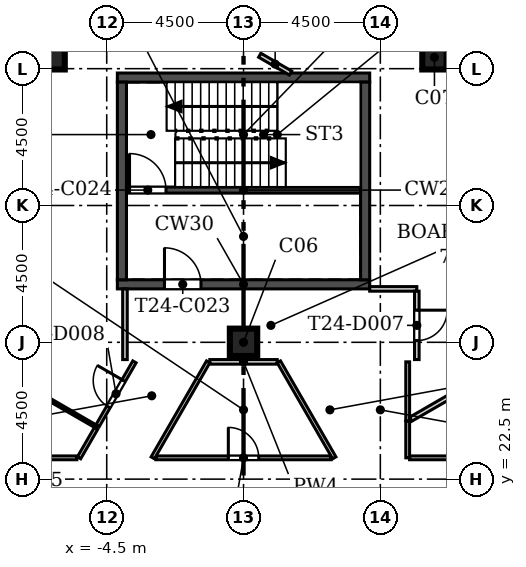
"""IFC4 building model, lengths in metres.
Left out: names, types, materials, properties, quantities, classifications, styles, units other than length and angle.
Written with IfcOpenShell. Run it as: python <this file> out.ifc"""

import sys

from ifc_helpers import new_model, si_unit, direction, frame, frame_2d, origin, origin_2d, place, context, subcontext, project, spatial, rectangle, extrude, element, fill, save


model = new_model("IFC4")
c1 = context("Model", 3, precision=1e-05, world=origin(), true_north=direction((0.0, 1.0)))
c2 = subcontext(c1, "Body", "Model", "MODEL_VIEW")
j1 = project(units=[si_unit("LENGTHUNIT", "METRE"), si_unit("PLANEANGLEUNIT", "RADIAN")], contexts=[c1])
p1 = place(None, origin())
s1 = spatial("IfcSite", under=j1, at=p1, CompositionType="ELEMENT")
p2 = place(p1, origin())
s2 = spatial("IfcBuilding", under=s1, at=p2, CompositionType="ELEMENT")
p3 = place(p2, frame((0.0, 0.0, 335.1)))
s3 = spatial("IfcBuildingStorey", under=s2, at=p3, CompositionType="ELEMENT", Elevation=335.1)
for number, where, z_axis, x_axis in (
    (1, (6.28, 36.374, 0.0), (0.0, 0.0, 1.0), (1.0, 0.0, 0.0)),
    (2, (-6.28, 36.374, 0.0), (0.0, 0.0, 1.0), (1.0, 0.0, 0.0)),
):
    element("IfcColumn", number, at=place(p3, frame(where, z_axis=z_axis, x_axis=x_axis)), inside=s3, PredefinedType="COLUMN", context=c2, shape_type="SweptSolid", body=[
        extrude(rectangle(XDim=0.8, YDim=0.8, at=origin_2d()), origin(), (0.0, 0.0, 1.0), 4.2),
    ])
p4 = place(p3, frame((0.0, 27.0, 0.0), z_axis=(0.0, 0.0, 1.0), x_axis=(1.0, 0.0, 0.0)))
e3 = element("IfcColumn", 3, at=p4, inside=s3, PredefinedType="COLUMN", context=c2, shape_type="SweptSolid", body=[
    extrude(rectangle(XDim=0.9, YDim=0.9, at=origin_2d()), origin(), (0.0, 0.0, 1.0), 4.2),
])
p5 = place(p3, frame((23.788, 7.709, 0.0), z_axis=(0.0, 0.0, 1.0), x_axis=(-0.500001731347, 0.866024404189, 0.0)))
e4 = element("IfcWall", 4, at=p5, inside=s3, PredefinedType="SOLIDWALL", context=c2, shape_type="SweptSolid", body=[
    extrude(rectangle(XDim=38.87, YDim=0.34, at=frame_2d((19.435, 0.0))), origin(), (0.0, 0.0, 1.0), 3.8),
])
p6 = place(p5, frame((3.218, 0.0, 0.9)))
e5 = element("IfcOpeningElement", 5, at=p6, cuts=e4, PredefinedType="OPENING", context=c2, shape_type="SweptSolid", body=[
    extrude(rectangle(XDim=1.885, YDim=2.6, at=frame_2d((0.942, 1.3))), frame((0.0, 0.18, 0.0), z_axis=(0.0, -1.0, 0.0), x_axis=(1.0, 0.0, 0.0)), (0.0, 0.0, 1.0), 0.36),
])
p7 = place(p5, frame((6.218, 0.0, 0.9)))
e6 = element("IfcOpeningElement", 6, at=p7, cuts=e4, PredefinedType="OPENING", context=c2, shape_type="SweptSolid", body=[
    extrude(rectangle(XDim=1.885, YDim=2.6, at=frame_2d((0.942, 1.3))), frame((0.0, 0.18, 0.0), z_axis=(0.0, -1.0, 0.0), x_axis=(1.0, 0.0, 0.0)), (0.0, 0.0, 1.0), 0.36),
])
p8 = place(p5, frame((9.218, 0.0, 0.9)))
e7 = element("IfcOpeningElement", 7, at=p8, cuts=e4, PredefinedType="OPENING", context=c2, shape_type="SweptSolid", body=[
    extrude(rectangle(XDim=1.885, YDim=2.6, at=frame_2d((0.942, 1.3))), frame((0.0, 0.18, 0.0), z_axis=(0.0, -1.0, 0.0), x_axis=(1.0, 0.0, 0.0)), (0.0, 0.0, 1.0), 0.36),
])
p9 = place(p5, frame((12.218, 0.0, 0.9)))
e8 = element("IfcOpeningElement", 8, at=p9, cuts=e4, PredefinedType="OPENING", context=c2, shape_type="SweptSolid", body=[
    extrude(rectangle(XDim=1.885, YDim=2.6, at=frame_2d((0.942, 1.3))), frame((0.0, 0.18, 0.0), z_axis=(0.0, -1.0, 0.0), x_axis=(1.0, 0.0, 0.0)), (0.0, 0.0, 1.0), 0.36),
])
p10 = place(p5, frame((15.218, 0.0, 0.9)))
e9 = element("IfcOpeningElement", 9, at=p10, cuts=e4, PredefinedType="OPENING", context=c2, shape_type="SweptSolid", body=[
    extrude(rectangle(XDim=1.885, YDim=2.6, at=frame_2d((0.942, 1.3))), frame((0.0, 0.18, 0.0), z_axis=(0.0, -1.0, 0.0), x_axis=(1.0, 0.0, 0.0)), (0.0, 0.0, 1.0), 0.36),
])
p11 = place(p5, frame((18.218, 0.0, 0.9)))
e10 = element("IfcOpeningElement", 10, at=p11, cuts=e4, PredefinedType="OPENING", context=c2, shape_type="SweptSolid", body=[
    extrude(rectangle(XDim=1.885, YDim=2.6, at=frame_2d((0.942, 1.3))), frame((0.0, 0.18, 0.0), z_axis=(0.0, -1.0, 0.0), x_axis=(1.0, 0.0, 0.0)), (0.0, 0.0, 1.0), 0.36),
])
p12 = place(p5, frame((21.218, 0.0, 0.9)))
e11 = element("IfcOpeningElement", 11, at=p12, cuts=e4, PredefinedType="OPENING", context=c2, shape_type="SweptSolid", body=[
    extrude(rectangle(XDim=1.885, YDim=2.6, at=frame_2d((0.942, 1.3))), frame((0.0, 0.18, 0.0), z_axis=(0.0, -1.0, 0.0), x_axis=(1.0, 0.0, 0.0)), (0.0, 0.0, 1.0), 0.36),
])
p13 = place(p5, frame((24.218, 0.0, 0.9)))
e12 = element("IfcOpeningElement", 12, at=p13, cuts=e4, PredefinedType="OPENING", context=c2, shape_type="SweptSolid", body=[
    extrude(rectangle(XDim=1.885, YDim=2.6, at=frame_2d((0.942, 1.3))), frame((0.0, 0.18, 0.0), z_axis=(0.0, -1.0, 0.0), x_axis=(1.0, 0.0, 0.0)), (0.0, 0.0, 1.0), 0.36),
])
p14 = place(p5, frame((27.218, 0.0, 0.9)))
e13 = element("IfcOpeningElement", 13, at=p14, cuts=e4, PredefinedType="OPENING", context=c2, shape_type="SweptSolid", body=[
    extrude(rectangle(XDim=1.885, YDim=2.6, at=frame_2d((0.942, 1.3))), frame((0.0, 0.18, 0.0), z_axis=(0.0, -1.0, 0.0), x_axis=(1.0, 0.0, 0.0)), (0.0, 0.0, 1.0), 0.36),
])
p15 = place(p5, frame((30.218, 0.0, 0.9)))
e14 = element("IfcOpeningElement", 14, at=p15, cuts=e4, PredefinedType="OPENING", context=c2, shape_type="SweptSolid", body=[
    extrude(rectangle(XDim=1.885, YDim=2.6, at=frame_2d((0.942, 1.3))), frame((0.0, 0.18, 0.0), z_axis=(0.0, -1.0, 0.0), x_axis=(1.0, 0.0, 0.0)), (0.0, 0.0, 1.0), 0.36),
])
p16 = place(p5, frame((33.218, 0.0, 0.9)))
e15 = element("IfcOpeningElement", 15, at=p16, cuts=e4, PredefinedType="OPENING", context=c2, shape_type="SweptSolid", body=[
    extrude(rectangle(XDim=1.885, YDim=2.6, at=frame_2d((0.942, 1.3))), frame((0.0, 0.18, 0.0), z_axis=(0.0, -1.0, 0.0), x_axis=(1.0, 0.0, 0.0)), (0.0, 0.0, 1.0), 0.36),
])
p17 = place(p5, frame((1.051, 0.0, 0.9)))
e16 = element("IfcOpeningElement", 16, at=p17, cuts=e4, PredefinedType="OPENING", context=c2, shape_type="SweptSolid", body=[
    extrude(rectangle(XDim=1.115, YDim=2.4, at=frame_2d((0.558, 1.2))), frame((0.0, 0.18, 0.0), z_axis=(0.0, -1.0, 0.0), x_axis=(1.0, 0.0, 0.0)), (0.0, 0.0, 1.0), 0.36),
])
p18 = place(p5, frame((36.429, 0.0, 0.9)))
e17 = element("IfcOpeningElement", 17, at=p18, cuts=e4, PredefinedType="OPENING", context=c2, shape_type="SweptSolid", body=[
    extrude(rectangle(XDim=1.115, YDim=2.4, at=frame_2d((0.558, 1.2))), frame((0.0, 0.18, 0.0), z_axis=(0.0, -1.0, 0.0), x_axis=(1.0, 0.0, 0.0)), (0.0, 0.0, 1.0), 0.36),
])
p19 = place(p3, frame((-4.353, 41.372, 0.0), z_axis=(0.0, 0.0, 1.0), x_axis=(-0.500001731347, -0.866024404189, 0.0)))
e18 = element("IfcWall", 18, at=p19, inside=s3, PredefinedType="SOLIDWALL", context=c2, shape_type="SweptSolid", body=[
    extrude(rectangle(XDim=38.87, YDim=0.34, at=frame_2d((19.435, 0.0))), origin(), (0.0, 0.0, 1.0), 3.8),
])
p20 = place(p19, frame((3.653, 0.0, 0.9)))
e19 = element("IfcOpeningElement", 19, at=p20, cuts=e18, PredefinedType="OPENING", context=c2, shape_type="SweptSolid", body=[
    extrude(rectangle(XDim=1.885, YDim=2.6, at=frame_2d((0.942, 1.3))), frame((0.0, 0.18, 0.0), z_axis=(0.0, -1.0, 0.0), x_axis=(1.0, 0.0, 0.0)), (0.0, 0.0, 1.0), 0.36),
])
p21 = place(p19, frame((6.653, 0.0, 0.9)))
e20 = element("IfcOpeningElement", 20, at=p21, cuts=e18, PredefinedType="OPENING", context=c2, shape_type="SweptSolid", body=[
    extrude(rectangle(XDim=1.885, YDim=2.6, at=frame_2d((0.942, 1.3))), frame((0.0, 0.18, 0.0), z_axis=(0.0, -1.0, 0.0), x_axis=(1.0, 0.0, 0.0)), (0.0, 0.0, 1.0), 0.36),
])
p22 = place(p19, frame((9.653, 0.0, 0.9)))
e21 = element("IfcOpeningElement", 21, at=p22, cuts=e18, PredefinedType="OPENING", context=c2, shape_type="SweptSolid", body=[
    extrude(rectangle(XDim=1.885, YDim=2.6, at=frame_2d((0.942, 1.3))), frame((0.0, 0.18, 0.0), z_axis=(0.0, -1.0, 0.0), x_axis=(1.0, 0.0, 0.0)), (0.0, 0.0, 1.0), 0.36),
])
p23 = place(p19, frame((12.653, 0.0, 0.9)))
e22 = element("IfcOpeningElement", 22, at=p23, cuts=e18, PredefinedType="OPENING", context=c2, shape_type="SweptSolid", body=[
    extrude(rectangle(XDim=1.885, YDim=2.6, at=frame_2d((0.942, 1.3))), frame((0.0, 0.18, 0.0), z_axis=(0.0, -1.0, 0.0), x_axis=(1.0, 0.0, 0.0)), (0.0, 0.0, 1.0), 0.36),
])
p24 = place(p19, frame((15.653, 0.0, 0.9)))
e23 = element("IfcOpeningElement", 23, at=p24, cuts=e18, PredefinedType="OPENING", context=c2, shape_type="SweptSolid", body=[
    extrude(rectangle(XDim=1.885, YDim=2.6, at=frame_2d((0.942, 1.3))), frame((0.0, 0.18, 0.0), z_axis=(0.0, -1.0, 0.0), x_axis=(1.0, 0.0, 0.0)), (0.0, 0.0, 1.0), 0.36),
])
p25 = place(p19, frame((18.653, 0.0, 0.9)))
e24 = element("IfcOpeningElement", 24, at=p25, cuts=e18, PredefinedType="OPENING", context=c2, shape_type="SweptSolid", body=[
    extrude(rectangle(XDim=1.885, YDim=2.6, at=frame_2d((0.942, 1.3))), frame((0.0, 0.18, 0.0), z_axis=(0.0, -1.0, 0.0), x_axis=(1.0, 0.0, 0.0)), (0.0, 0.0, 1.0), 0.36),
])
p26 = place(p19, frame((21.653, 0.0, 0.9)))
e25 = element("IfcOpeningElement", 25, at=p26, cuts=e18, PredefinedType="OPENING", context=c2, shape_type="SweptSolid", body=[
    extrude(rectangle(XDim=1.885, YDim=2.6, at=frame_2d((0.942, 1.3))), frame((0.0, 0.18, 0.0), z_axis=(0.0, -1.0, 0.0), x_axis=(1.0, 0.0, 0.0)), (0.0, 0.0, 1.0), 0.36),
])
p27 = place(p19, frame((24.653, 0.0, 0.9)))
e26 = element("IfcOpeningElement", 26, at=p27, cuts=e18, PredefinedType="OPENING", context=c2, shape_type="SweptSolid", body=[
    extrude(rectangle(XDim=1.885, YDim=2.6, at=frame_2d((0.942, 1.3))), frame((0.0, 0.18, 0.0), z_axis=(0.0, -1.0, 0.0), x_axis=(1.0, 0.0, 0.0)), (0.0, 0.0, 1.0), 0.36),
])
p28 = place(p19, frame((27.653, 0.0, 0.9)))
e27 = element("IfcOpeningElement", 27, at=p28, cuts=e18, PredefinedType="OPENING", context=c2, shape_type="SweptSolid", body=[
    extrude(rectangle(XDim=1.885, YDim=2.6, at=frame_2d((0.942, 1.3))), frame((0.0, 0.18, 0.0), z_axis=(0.0, -1.0, 0.0), x_axis=(1.0, 0.0, 0.0)), (0.0, 0.0, 1.0), 0.36),
])
p29 = place(p19, frame((30.653, 0.0, 0.9)))
e28 = element("IfcOpeningElement", 28, at=p29, cuts=e18, PredefinedType="OPENING", context=c2, shape_type="SweptSolid", body=[
    extrude(rectangle(XDim=1.885, YDim=2.6, at=frame_2d((0.942, 1.3))), frame((0.0, 0.18, 0.0), z_axis=(0.0, -1.0, 0.0), x_axis=(1.0, 0.0, 0.0)), (0.0, 0.0, 1.0), 0.36),
])
p30 = place(p19, frame((33.653, 0.0, 0.9)))
e29 = element("IfcOpeningElement", 29, at=p30, cuts=e18, PredefinedType="OPENING", context=c2, shape_type="SweptSolid", body=[
    extrude(rectangle(XDim=1.885, YDim=2.6, at=frame_2d((0.942, 1.3))), frame((0.0, 0.18, 0.0), z_axis=(0.0, -1.0, 0.0), x_axis=(1.0, 0.0, 0.0)), (0.0, 0.0, 1.0), 0.36),
])
p31 = place(p19, frame((1.269, 0.0, 0.9)))
e30 = element("IfcOpeningElement", 30, at=p31, cuts=e18, PredefinedType="OPENING", context=c2, shape_type="SweptSolid", body=[
    extrude(rectangle(XDim=1.115, YDim=2.4, at=frame_2d((0.558, 1.2))), frame((0.0, 0.18, 0.0), z_axis=(0.0, -1.0, 0.0), x_axis=(1.0, 0.0, 0.0)), (0.0, 0.0, 1.0), 0.36),
])
p32 = place(p19, frame((36.646, 0.0, 0.9)))
e31 = element("IfcOpeningElement", 31, at=p32, cuts=e18, PredefinedType="OPENING", context=c2, shape_type="SweptSolid", body=[
    extrude(rectangle(XDim=1.115, YDim=2.4, at=frame_2d((0.558, 1.2))), frame((0.0, 0.18, 0.0), z_axis=(0.0, -1.0, 0.0), x_axis=(1.0, 0.0, 0.0)), (0.0, 0.0, 1.0), 0.36),
])
p33 = place(p3, frame((-4.15, 28.907, -0.4), z_axis=(0.0, 0.0, 1.0), x_axis=(1.0, 0.0, 0.0)))
e32 = element("IfcWall", 32, at=p33, inside=s3, PredefinedType="SOLIDWALL", context=c2, shape_type="SweptSolid", body=[
    extrude(rectangle(XDim=8.3, YDim=0.3, at=frame_2d((4.15, 0.0))), origin(), (0.0, 0.0, 1.0), 4.2),
])
p34 = place(p33, frame((1.55, 0.0, 0.4)))
e33 = element("IfcOpeningElement", 33, at=p34, cuts=e32, PredefinedType="OPENING", context=c2, shape_type="SweptSolid", body=[
    extrude(rectangle(XDim=1.2, YDim=2.1, at=frame_2d((0.6, 1.05))), frame((0.0, 0.16, 0.0), z_axis=(0.0, -1.0, 0.0), x_axis=(1.0, 0.0, 0.0)), (0.0, 0.0, 1.0), 0.32),
])
p35 = place(p3, frame((-4.15, 35.707, -0.4), z_axis=(0.0, 0.0, 1.0), x_axis=(1.0, 0.0, 0.0)))
e34 = element("IfcWall", 34, at=p35, inside=s3, PredefinedType="SOLIDWALL", context=c2, shape_type="SweptSolid", body=[
    extrude(rectangle(XDim=8.3, YDim=0.3, at=frame_2d((4.15, 0.0))), origin(), (0.0, 0.0, 1.0), 4.2),
])
for number, where, z_axis, x_axis in (
    (35, (-4.0, 29.057, -0.4), (0.0, 0.0, 1.0), (0.0, 1.0, 0.0)),
    (36, (4.0, 29.057, -0.4), (0.0, 0.0, 1.0), (0.0, 1.0, 0.0)),
):
    element("IfcWall", number, at=place(p3, frame(where, z_axis=z_axis, x_axis=x_axis)), inside=s3, PredefinedType="SOLIDWALL", context=c2, shape_type="SweptSolid", body=[
        extrude(rectangle(XDim=6.5, YDim=0.3, at=frame_2d((3.25, 0.0))), origin(), (0.0, 0.0, 1.0), 4.2),
    ])
p36 = place(p3, frame((-3.85, 32.007, -0.4), z_axis=(0.0, 0.0, 1.0), x_axis=(1.0, 0.0, 0.0)))
e37 = element("IfcWall", 37, at=p36, inside=s3, PredefinedType="SOLIDWALL", context=c2, shape_type="SweptSolid", body=[
    extrude(rectangle(XDim=7.7, YDim=0.2, at=frame_2d((3.85, 0.0))), origin(), (0.0, 0.0, 1.0), 4.2),
])
p37 = place(p36, frame((0.1, 0.0, 0.4)))
e38 = element("IfcOpeningElement", 38, at=p37, cuts=e37, PredefinedType="OPENING", context=c2, shape_type="SweptSolid", body=[
    extrude(rectangle(XDim=1.2, YDim=2.1, at=frame_2d((0.6, 1.05))), frame((0.0, 0.11, 0.0), z_axis=(0.0, -1.0, 0.0), x_axis=(1.0, 0.0, 0.0)), (0.0, 0.0, 1.0), 0.22),
])
p38 = place(p3, frame((5.462, 23.2, 0.0), z_axis=(0.0, 0.0, 1.0), x_axis=(1.0, 0.0, 0.0)))
e39 = element("IfcWall", 39, at=p38, inside=s3, PredefinedType="PARTITIONING", context=c2, shape_type="SweptSolid", body=[
    extrude(rectangle(XDim=6.475, YDim=0.125, at=frame_2d((3.238, 0.0))), origin(), (0.0, 0.0, 1.0), 3.8),
])
p39 = place(p38, frame((2.738, 0.0, 0.0)))
e40 = element("IfcOpeningElement", 40, at=p39, cuts=e39, PredefinedType="OPENING", context=c2, shape_type="SweptSolid", body=[
    extrude(rectangle(XDim=1.0, YDim=2.1, at=frame_2d((0.5, 1.05))), frame((0.0, 0.073, 0.0), z_axis=(0.0, -1.0, 0.0), x_axis=(1.0, 0.0, 0.0)), (0.0, 0.0, 1.0), 0.145),
])
p40 = place(p3, frame((-2.877, 23.2, 0.0), z_axis=(0.0, 0.0, 1.0), x_axis=(1.0, 0.0, 0.0)))
e41 = element("IfcWall", 41, at=p40, inside=s3, PredefinedType="PARTITIONING", context=c2, shape_type="SweptSolid", body=[
    extrude(rectangle(XDim=5.753, YDim=0.125, at=frame_2d((2.877, 0.0))), origin(), (0.0, 0.0, 1.0), 3.8),
])
p41 = place(p40, frame((2.377, 0.0, 0.0)))
e42 = element("IfcOpeningElement", 42, at=p41, cuts=e41, PredefinedType="OPENING", context=c2, shape_type="SweptSolid", body=[
    extrude(rectangle(XDim=1.0, YDim=2.1, at=frame_2d((0.5, 1.05))), frame((0.0, 0.073, 0.0), z_axis=(0.0, -1.0, 0.0), x_axis=(1.0, 0.0, 0.0)), (0.0, 0.0, 1.0), 0.145),
])
p42 = place(p3, frame((-9.6, 23.2, 0.0), z_axis=(0.0, 0.0, 1.0), x_axis=(1.0, 0.0, 0.0)))
e43 = element("IfcWall", 43, at=p42, inside=s3, PredefinedType="PARTITIONING", context=c2, shape_type="SweptSolid", body=[
    extrude(rectangle(XDim=4.118, YDim=0.125, at=frame_2d((2.059, 0.0))), origin(), (0.0, 0.0, 1.0), 3.8),
])
p43 = place(p42, frame((1.559, 0.0, 0.0)))
e44 = element("IfcOpeningElement", 44, at=p43, cuts=e43, PredefinedType="OPENING", context=c2, shape_type="SweptSolid", body=[
    extrude(rectangle(XDim=1.0, YDim=2.1, at=frame_2d((0.5, 1.05))), frame((0.0, 0.073, 0.0), z_axis=(0.0, -1.0, 0.0), x_axis=(1.0, 0.0, 0.0)), (0.0, 0.0, 1.0), 0.145),
])
p44 = place(p3, frame((4.15, 28.757, 0.0), z_axis=(0.0, 0.0, 1.0), x_axis=(1.0, 0.0, 0.0)))
e45 = element("IfcWall", 45, at=p44, inside=s3, PredefinedType="PARTITIONING", context=c2, shape_type="SweptSolid", body=[
    extrude(rectangle(XDim=1.55, YDim=0.15, at=frame_2d((0.775, 0.0))), origin(), (0.0, 0.0, 1.0), 3.8),
])
p45 = place(p3, frame((5.7, 28.682, 0.0), z_axis=(0.0, 0.0, 1.0), x_axis=(0.0, -1.0, 0.0)))
e46 = element("IfcWall", 46, at=p45, inside=s3, PredefinedType="PARTITIONING", context=c2, shape_type="SweptSolid", body=[
    extrude(rectangle(XDim=2.25, YDim=0.15, at=frame_2d((1.125, 0.0))), origin(), (0.0, 0.0, 1.0), 3.8),
])
p46 = place(p45, frame((0.625, 0.0, 0.0)))
e47 = element("IfcOpeningElement", 47, at=p46, cuts=e46, PredefinedType="OPENING", context=c2, shape_type="SweptSolid", body=[
    extrude(rectangle(XDim=1.0, YDim=2.1, at=frame_2d((0.5, 1.05))), frame((0.0, 0.085, 0.0), z_axis=(0.0, -1.0, 0.0), x_axis=(1.0, 0.0, 0.0)), (0.0, 0.0, 1.0), 0.17),
])
p47 = place(p3, frame((1.109, 26.357, 0.0), z_axis=(0.0, 0.0, 1.0), x_axis=(-1.0, 0.0, 0.0)))
e48 = element("IfcWall", 48, at=p47, inside=s3, PredefinedType="PARTITIONING", context=c2, shape_type="SweptSolid", body=[
    extrude(rectangle(XDim=2.218, YDim=0.15, at=frame_2d((1.109, 0.0))), origin(), (0.0, 0.0, 1.0), 3.8),
])
p48 = place(p3, frame((-3.9, 26.432, 0.0), z_axis=(0.0, 0.0, 1.0), x_axis=(0.0, 1.0, 0.0)))
e49 = element("IfcWall", 49, at=p48, inside=s3, PredefinedType="PARTITIONING", context=c2, shape_type="SweptSolid", body=[
    extrude(rectangle(XDim=2.325, YDim=0.15, at=frame_2d((1.163, 0.0))), origin(), (0.0, 0.0, 1.0), 3.8),
])
p49 = place(p3, frame((-1.163, 26.357, 0.0), z_axis=(0.0, 0.0, 1.0), x_axis=(-0.500014248385, -0.866017177319, 0.0)))
e50 = element("IfcWall", 50, at=p49, inside=s3, PredefinedType="PARTITIONING", context=c2, shape_type="SweptSolid", body=[
    extrude(rectangle(XDim=3.646, YDim=0.125, at=frame_2d((1.823, 0.0))), origin(), (0.0, 0.0, 1.0), 3.8),
])
p50 = place(p3, frame((-4.8, 24.258, 0.0), z_axis=(0.0, 0.0, 1.0), x_axis=(0.499995647607, 0.866027916625, 0.0)))
e51 = element("IfcWall", 51, at=p50, inside=s3, PredefinedType="PARTITIONING", context=c2, shape_type="SweptSolid", body=[
    extrude(rectangle(XDim=2.424, YDim=0.125, at=frame_2d((1.212, 0.0))), origin(), (0.0, 0.0, 1.0), 3.8),
])
p51 = place(p50, frame((0.712, 0.0, 0.0)))
e52 = element("IfcOpeningElement", 52, at=p51, cuts=e51, PredefinedType="OPENING", context=c2, shape_type="SweptSolid", body=[
    extrude(rectangle(XDim=1.0, YDim=2.1, at=frame_2d((0.5, 1.05))), frame((0.0, 0.073, 0.0), z_axis=(0.0, -1.0, 0.0), x_axis=(1.0, 0.0, 0.0)), (0.0, 0.0, 1.0), 0.145),
])
p52 = place(p3, frame((-5.41, 23.2, 0.0), z_axis=(0.0, 0.0, 1.0), x_axis=(0.500005339912, 0.866022320763, 0.0)))
e53 = element("IfcWall", 53, at=p52, inside=s3, PredefinedType="PARTITIONING", context=c2, shape_type="SweptSolid", body=[
    extrude(rectangle(XDim=1.121, YDim=0.125, at=frame_2d((0.56, 0.0))), origin(), (0.0, 0.0, 1.0), 3.8),
])
p53 = place(p3, frame((2.985, 23.2, 0.0), z_axis=(0.0, 0.0, 1.0), x_axis=(-0.500014248385, 0.866017177319, 0.0)))
e54 = element("IfcWall", 54, at=p53, inside=s3, PredefinedType="PARTITIONING", context=c2, shape_type="SweptSolid", body=[
    extrude(rectangle(XDim=3.646, YDim=0.125, at=frame_2d((1.823, 0.0))), origin(), (0.0, 0.0, 1.0), 3.8),
])
p54 = place(p3, frame((5.4, 24.413, 0.0), z_axis=(0.0, 0.0, 1.0), x_axis=(0.0, -1.0, 0.0)))
e55 = element("IfcWall", 55, at=p54, inside=s3, PredefinedType="PARTITIONING", context=c2, shape_type="SweptSolid", body=[
    extrude(rectangle(XDim=1.213, YDim=0.125, at=frame_2d((0.607, 0.0))), origin(), (0.0, 0.0, 1.0), 3.8),
])
p55 = place(p3, frame((5.4, 26.357, 0.0), z_axis=(0.0, 0.0, 1.0), x_axis=(0.0, -1.0, 0.0)))
e56 = element("IfcWall", 56, at=p55, inside=s3, PredefinedType="PARTITIONING", context=c2, shape_type="SweptSolid", body=[
    extrude(rectangle(XDim=1.944, YDim=0.125, at=frame_2d((0.972, 0.0))), origin(), (0.0, 0.0, 1.0), 3.8),
])
p56 = place(p3, frame((5.5, 24.471, 0.0), z_axis=(0.0, 0.0, 1.0), x_axis=(0.866028417731, 0.499994779655, 0.0)))
e57 = element("IfcWall", 57, at=p56, inside=s3, PredefinedType="PARTITIONING", context=c2, shape_type="SweptSolid", body=[
    extrude(rectangle(XDim=6.674, YDim=0.15, at=frame_2d((3.337, 0.0))), origin(), (0.0, 0.0, 1.0), 3.8),
])
p57 = place(p3, frame((1.546, 35.857, 0.0), z_axis=(0.0, 0.0, 1.0), x_axis=(-0.86601174498, 0.500023656998, 0.0)))
e58 = element("IfcWall", 58, at=p57, inside=s3, PredefinedType="PARTITIONING", context=c2, shape_type="SweptSolid", body=[
    extrude(rectangle(XDim=1.169, YDim=0.15, at=frame_2d((0.585, 0.0))), origin(), (0.0, 0.0, 1.0), 3.8),
])
p58 = place(p3, frame((-4.825, 24.214, 0.0), z_axis=(0.0, 0.0, 1.0), x_axis=(-0.866037970569, 0.499978233058, 0.0)))
e59 = element("IfcWall", 59, at=p58, inside=s3, PredefinedType="PARTITIONING", context=c2, shape_type="SweptSolid", body=[
    extrude(rectangle(XDim=7.188, YDim=0.1, at=frame_2d((3.594, 0.0))), origin(), (0.0, 0.0, 1.0), 3.8),
])
p59 = place(p58, frame((3.094, 0.0, 0.0)))
e60 = element("IfcOpeningElement", 60, at=p59, cuts=e59, PredefinedType="OPENING", context=c2, shape_type="SweptSolid", body=[
    extrude(rectangle(XDim=1.0, YDim=2.1, at=frame_2d((0.5, 1.05))), frame((0.0, 0.06, 0.0), z_axis=(0.0, -1.0, 0.0), x_axis=(1.0, 0.0, 0.0)), (0.0, 0.0, 1.0), 0.12),
])
p60 = place(p16, origin())
e61 = element("IfcWindow", 61, at=p60, inside=s3, PartitioningType="SINGLE_PANEL", PredefinedType="WINDOW", context=c2, shape_type="SweptSolid", body=[
    extrude(rectangle(XDim=1.885, YDim=2.6, at=frame_2d((0.942, 1.3))), frame((0.0, 0.11, 0.0), z_axis=(0.0, -1.0, 0.0), x_axis=(1.0, 0.0, 0.0)), (0.0, 0.0, 1.0), 0.06),
])
fill(e15, e61)
p61 = place(p20, origin())
e62 = element("IfcWindow", 62, at=p61, inside=s3, PartitioningType="SINGLE_PANEL", PredefinedType="WINDOW", context=c2, shape_type="SweptSolid", body=[
    extrude(rectangle(XDim=1.885, YDim=2.6, at=frame_2d((0.942, 1.3))), frame((0.0, 0.11, 0.0), z_axis=(0.0, -1.0, 0.0), x_axis=(1.0, 0.0, 0.0)), (0.0, 0.0, 1.0), 0.06),
])
fill(e19, e62)
p62 = place(p34, origin())
e63 = element("IfcDoor", 63, at=p62, inside=s3, OperationType="SINGLE_SWING_LEFT", PredefinedType="DOOR", context=c2, shape_type="SweptSolid", body=[
    extrude(rectangle(XDim=1.2, YDim=2.1, at=frame_2d((0.6, 1.05))), frame((0.0, 0.025, 0.0), z_axis=(0.0, -1.0, 0.0), x_axis=(1.0, 0.0, 0.0)), (0.0, 0.0, 1.0), 0.05),
])
fill(e33, e63)
p63 = place(p37, origin())
e64 = element("IfcDoor", 64, at=p63, inside=s3, OperationType="SINGLE_SWING_LEFT", PredefinedType="DOOR", context=c2, shape_type="SweptSolid", body=[
    extrude(rectangle(XDim=1.2, YDim=2.1, at=frame_2d((0.6, 1.05))), frame((0.0, 0.025, 0.0), z_axis=(0.0, -1.0, 0.0), x_axis=(1.0, 0.0, 0.0)), (0.0, 0.0, 1.0), 0.05),
])
fill(e38, e64)
p64 = place(p41, origin())
e65 = element("IfcDoor", 65, at=p64, inside=s3, OperationType="SINGLE_SWING_LEFT", PredefinedType="DOOR", context=c2, shape_type="SweptSolid", body=[
    extrude(rectangle(XDim=1.0, YDim=2.1, at=frame_2d((0.5, 1.05))), frame((0.0, 0.025, 0.0), z_axis=(0.0, -1.0, 0.0), x_axis=(1.0, 0.0, 0.0)), (0.0, 0.0, 1.0), 0.05),
])
fill(e42, e65)
p65 = place(p46, origin())
e66 = element("IfcDoor", 66, at=p65, inside=s3, OperationType="SINGLE_SWING_LEFT", PredefinedType="DOOR", context=c2, shape_type="SweptSolid", body=[
    extrude(rectangle(XDim=1.0, YDim=2.1, at=frame_2d((0.5, 1.05))), frame((0.0, 0.025, 0.0), z_axis=(0.0, -1.0, 0.0), x_axis=(1.0, 0.0, 0.0)), (0.0, 0.0, 1.0), 0.05),
])
fill(e47, e66)
p66 = place(p51, origin())
e67 = element("IfcDoor", 67, at=p66, inside=s3, OperationType="SINGLE_SWING_RIGHT", PredefinedType="DOOR", context=c2, shape_type="SweptSolid", body=[
    extrude(rectangle(XDim=1.0, YDim=2.1, at=frame_2d((0.5, 1.05))), frame((0.0, 0.025, 0.0), z_axis=(0.0, -1.0, 0.0), x_axis=(1.0, 0.0, 0.0)), (0.0, 0.0, 1.0), 0.05),
])
fill(e52, e67)
save(model, sys.argv[1])
